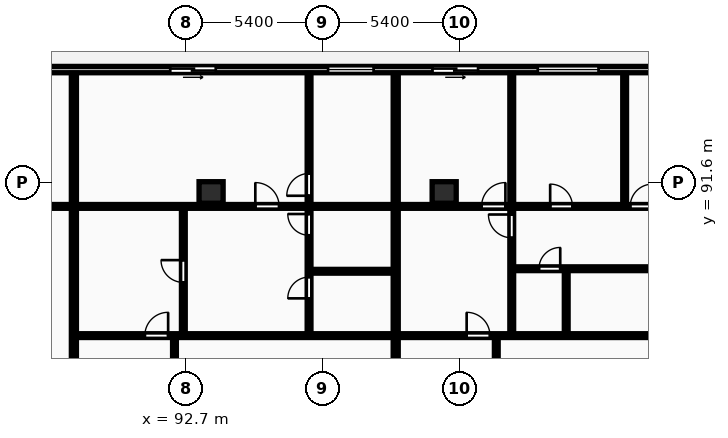
"""IFC4 building model, lengths in metres.
Left out: names, types, materials, properties, quantities, classifications, styles, units other than length and angle.
Written with IfcOpenShell. Run it as: python <this file> out.ifc"""

import sys

from ifc_helpers import new_model, si_unit, direction, frame, frame_2d, origin, origin_2d, place, context, subcontext, project, spatial, rectangle, extrude, element, fill, save


model = new_model("IFC4")
c1 = context("Model", 3, precision=1e-05, world=origin(), true_north=direction((0.0, 1.0)))
c2 = subcontext(c1, "Body", "Model", "MODEL_VIEW")
j1 = project(units=[si_unit("LENGTHUNIT", "METRE"), si_unit("PLANEANGLEUNIT", "RADIAN")], contexts=[c1])
p1 = place(None, origin())
s1 = spatial("IfcSite", under=j1, at=p1, CompositionType="ELEMENT")
p2 = place(p1, origin())
s2 = spatial("IfcBuilding", under=s1, at=p2, CompositionType="ELEMENT")
p3 = place(p2, frame((0.0, 0.0, 80.8)))
s3 = spatial("IfcBuildingStorey", under=s2, at=p3, CompositionType="ELEMENT", Elevation=80.8)
for number, where, z_axis, x_axis in (
    (1, (93.7, 91.2, 0.0), (0.0, 0.0, 1.0), (1.0, 0.0, 0.0)),
    (2, (102.9, 91.2, 0.0), (0.0, 0.0, 1.0), (1.0, 0.0, 0.0)),
):
    element("IfcColumn", number, at=place(p3, frame(where, z_axis=z_axis, x_axis=x_axis)), inside=s3, PredefinedType="COLUMN", context=c2, shape_type="SweptSolid", body=[
        extrude(rectangle(XDim=0.95, YDim=0.85, at=origin_2d()), origin(), (0.0, 0.0, 1.0), 3.25),
    ])
p4 = place(p3, frame((130.6, 96.05, 0.0), z_axis=(0.0, 0.0, 1.0), x_axis=(-1.0, 0.0, 0.0)))
e3 = element("IfcWall", 3, at=p4, inside=s3, PredefinedType="STANDARD", context=c2, shape_type="SweptSolid", body=[
    extrude(rectangle(XDim=73.0, YDim=0.25, at=frame_2d((36.5, 0.0))), origin(), (0.0, 0.0, 1.0), 2.97),
])
p5 = place(p4, frame((67.867, 0.0, 0.0)))
e4 = element("IfcOpeningElement", 4, at=p5, cuts=e3, PredefinedType="OPENING", context=c2, shape_type="SweptSolid", body=[
    extrude(rectangle(XDim=1.8, YDim=2.2, at=frame_2d((0.9, 1.1))), frame((0.0, 0.135, 0.0), z_axis=(0.0, -1.0, 0.0), x_axis=(1.0, 0.0, 0.0)), (0.0, 0.0, 1.0), 0.27),
])
p6 = place(p4, frame((62.103, 0.0, 0.85)))
e5 = element("IfcOpeningElement", 5, at=p6, cuts=e3, PredefinedType="OPENING", context=c2, shape_type="SweptSolid", body=[
    extrude(rectangle(XDim=1.8, YDim=1.8, at=frame_2d((0.9, 0.9))), frame((0.0, 0.135, 0.0), z_axis=(0.0, -1.0, 0.0), x_axis=(1.0, 0.0, 0.0)), (0.0, 0.0, 1.0), 0.27),
])
p7 = place(p4, frame((56.196, 0.0, 0.0)))
e6 = element("IfcOpeningElement", 6, at=p7, cuts=e3, PredefinedType="OPENING", context=c2, shape_type="SweptSolid", body=[
    extrude(rectangle(XDim=1.8, YDim=2.2, at=frame_2d((0.9, 1.1))), frame((0.0, 0.135, 0.0), z_axis=(0.0, -1.0, 0.0), x_axis=(1.0, 0.0, 0.0)), (0.0, 0.0, 1.0), 0.27),
])
p8 = place(p4, frame((46.557, 0.0, 0.85)))
e7 = element("IfcOpeningElement", 7, at=p8, cuts=e3, PredefinedType="OPENING", context=c2, shape_type="SweptSolid", body=[
    extrude(rectangle(XDim=2.4, YDim=1.9, at=frame_2d((1.2, 0.95))), frame((0.0, 0.135, 0.0), z_axis=(0.0, -1.0, 0.0), x_axis=(1.0, 0.0, 0.0)), (0.0, 0.0, 1.0), 0.27),
])
p9 = place(p4, frame((36.714, 0.0, 0.0)))
e8 = element("IfcOpeningElement", 8, at=p9, cuts=e3, PredefinedType="OPENING", context=c2, shape_type="SweptSolid", body=[
    extrude(rectangle(XDim=1.8, YDim=2.2, at=frame_2d((0.9, 1.1))), frame((0.0, 0.135, 0.0), z_axis=(0.0, -1.0, 0.0), x_axis=(1.0, 0.0, 0.0)), (0.0, 0.0, 1.0), 0.27),
])
p10 = place(p4, frame((30.483, 0.0, 0.85)))
e9 = element("IfcOpeningElement", 9, at=p10, cuts=e3, PredefinedType="OPENING", context=c2, shape_type="SweptSolid", body=[
    extrude(rectangle(XDim=1.8, YDim=1.8, at=frame_2d((0.9, 0.9))), frame((0.0, 0.135, 0.0), z_axis=(0.0, -1.0, 0.0), x_axis=(1.0, 0.0, 0.0)), (0.0, 0.0, 1.0), 0.27),
])
p11 = place(p4, frame((21.604, 0.0, 0.85)))
e10 = element("IfcOpeningElement", 10, at=p11, cuts=e3, PredefinedType="OPENING", context=c2, shape_type="SweptSolid", body=[
    extrude(rectangle(XDim=2.4, YDim=1.9, at=frame_2d((1.2, 0.95))), frame((0.0, 0.135, 0.0), z_axis=(0.0, -1.0, 0.0), x_axis=(1.0, 0.0, 0.0)), (0.0, 0.0, 1.0), 0.27),
])
p12 = place(p4, frame((17.698, 0.0, 0.85)))
e11 = element("IfcOpeningElement", 11, at=p12, cuts=e3, PredefinedType="OPENING", context=c2, shape_type="SweptSolid", body=[
    extrude(rectangle(XDim=1.8, YDim=1.8, at=frame_2d((0.9, 0.9))), frame((0.0, 0.135, 0.0), z_axis=(0.0, -1.0, 0.0), x_axis=(1.0, 0.0, 0.0)), (0.0, 0.0, 1.0), 0.27),
])
p13 = place(p4, frame((26.363, 0.0, 0.0)))
e12 = element("IfcOpeningElement", 12, at=p13, cuts=e3, PredefinedType="OPENING", context=c2, shape_type="SweptSolid", body=[
    extrude(rectangle(XDim=1.8, YDim=2.2, at=frame_2d((0.9, 1.1))), frame((0.0, 0.135, 0.0), z_axis=(0.0, -1.0, 0.0), x_axis=(1.0, 0.0, 0.0)), (0.0, 0.0, 1.0), 0.27),
])
p14 = place(p4, frame((13.753, 0.0, 0.85)))
e13 = element("IfcOpeningElement", 13, at=p14, cuts=e3, PredefinedType="OPENING", context=c2, shape_type="SweptSolid", body=[
    extrude(rectangle(XDim=1.8, YDim=1.8, at=frame_2d((0.9, 0.9))), frame((0.0, 0.135, 0.0), z_axis=(0.0, -1.0, 0.0), x_axis=(1.0, 0.0, 0.0)), (0.0, 0.0, 1.0), 0.27),
])
p15 = place(p4, frame((7.363, 0.0, 0.0)))
e14 = element("IfcOpeningElement", 14, at=p15, cuts=e3, PredefinedType="OPENING", context=c2, shape_type="SweptSolid", body=[
    extrude(rectangle(XDim=1.8, YDim=2.2, at=frame_2d((0.9, 1.1))), frame((0.0, 0.135, 0.0), z_axis=(0.0, -1.0, 0.0), x_axis=(1.0, 0.0, 0.0)), (0.0, 0.0, 1.0), 0.27),
])
p16 = place(p4, frame((0.9, 0.0, 0.85)))
e15 = element("IfcOpeningElement", 15, at=p16, cuts=e3, PredefinedType="OPENING", context=c2, shape_type="SweptSolid", body=[
    extrude(rectangle(XDim=2.4, YDim=1.9, at=frame_2d((1.2, 0.95))), frame((0.0, 0.135, 0.0), z_axis=(0.0, -1.0, 0.0), x_axis=(1.0, 0.0, 0.0)), (0.0, 0.0, 1.0), 0.27),
])
p17 = place(p3, frame((88.285, 69.43, 0.0), z_axis=(0.0, 0.0, 1.0), x_axis=(0.0, 1.0, 0.0)))
e16 = element("IfcWall", 16, at=p17, inside=s3, PredefinedType="PARTITIONING", context=c2, shape_type="SweptSolid", body=[
    extrude(rectangle(XDim=26.47, YDim=0.2, at=frame_2d((13.235, 0.0))), origin(), (0.0, 0.0, 1.0), 2.97),
])
p18 = place(p3, frame((69.447, 90.65, 0.0), z_axis=(0.0, 0.0, 1.0), x_axis=(1.0, 0.0, 0.0)))
e17 = element("IfcWall", 17, at=p18, inside=s3, PredefinedType="PARTITIONING", context=c2, shape_type="SweptSolid", body=[
    extrude(rectangle(XDim=18.758, YDim=0.15, at=frame_2d((9.379, 0.0))), origin(), (0.0, 0.0, 1.0), 2.97),
])
p19 = place(p18, frame((3.965, 0.0, 0.0)))
e18 = element("IfcOpeningElement", 18, at=p19, cuts=e17, PredefinedType="OPENING", context=c2, shape_type="SweptSolid", body=[
    extrude(rectangle(XDim=0.94, YDim=2.1, at=frame_2d((0.47, 1.05))), frame((0.0, 0.085, 0.0), z_axis=(0.0, -1.0, 0.0), x_axis=(1.0, 0.0, 0.0)), (0.0, 0.0, 1.0), 0.17),
])
p20 = place(p18, frame((8.909, 0.0, 0.0)))
e19 = element("IfcOpeningElement", 19, at=p20, cuts=e17, PredefinedType="OPENING", context=c2, shape_type="SweptSolid", body=[
    extrude(rectangle(XDim=0.94, YDim=2.1, at=frame_2d((0.47, 1.05))), frame((0.0, 0.085, 0.0), z_axis=(0.0, -1.0, 0.0), x_axis=(1.0, 0.0, 0.0)), (0.0, 0.0, 1.0), 0.17),
])
p21 = place(p3, frame((100.987, 69.43, 0.0), z_axis=(0.0, 0.0, 1.0), x_axis=(0.0, 1.0, 0.0)))
e20 = element("IfcWall", 20, at=p21, inside=s3, PredefinedType="PARTITIONING", context=c2, shape_type="SweptSolid", body=[
    extrude(rectangle(XDim=26.47, YDim=0.2, at=frame_2d((13.235, 0.0))), origin(), (0.0, 0.0, 1.0), 2.97),
])
p22 = place(p3, frame((92.255, 69.41, 0.0), z_axis=(0.0, 0.0, 1.0), x_axis=(0.0, 1.0, 0.0)))
e21 = element("IfcWall", 21, at=p22, inside=s3, PredefinedType="PARTITIONING", context=c2, shape_type="SweptSolid", body=[
    extrude(rectangle(XDim=16.1, YDim=0.15, at=frame_2d((8.05, 0.0))), origin(), (0.0, 0.0, 1.0), 2.97),
])
p23 = place(p22, frame((6.74, 0.0, 0.0)))
e22 = element("IfcOpeningElement", 22, at=p23, cuts=e21, PredefinedType="OPENING", context=c2, shape_type="SweptSolid", body=[
    extrude(rectangle(XDim=0.88, YDim=2.06, at=frame_2d((0.44, 1.03))), frame((0.0, 0.085, 0.0), z_axis=(0.0, -1.0, 0.0), x_axis=(1.0, 0.0, 0.0)), (0.0, 0.0, 1.0), 0.17),
])
p24 = place(p3, frame((92.604, 85.59, 0.0), z_axis=(0.0, 0.0, 1.0), x_axis=(0.0, 1.0, 0.0)))
e23 = element("IfcWall", 23, at=p24, inside=s3, PredefinedType="PARTITIONING", context=c2, shape_type="SweptSolid", body=[
    extrude(rectangle(XDim=5.0, YDim=0.15, at=frame_2d((2.5, 0.0))), origin(), (0.0, 0.0, 1.0), 2.97),
])
p25 = place(p24, frame((2.06, 0.0, 0.0)))
e24 = element("IfcOpeningElement", 24, at=p25, cuts=e23, PredefinedType="OPENING", context=c2, shape_type="SweptSolid", body=[
    extrude(rectangle(XDim=0.88, YDim=2.06, at=frame_2d((0.44, 1.03))), frame((0.0, 0.085, 0.0), z_axis=(0.0, -1.0, 0.0), x_axis=(1.0, 0.0, 0.0)), (0.0, 0.0, 1.0), 0.17),
])
p26 = place(p3, frame((97.627, 88.09, 0.0), z_axis=(0.0, 0.0, 1.0), x_axis=(1.0, 0.0, 0.0)))
e25 = element("IfcWall", 25, at=p26, inside=s3, PredefinedType="PARTITIONING", context=c2, shape_type="SweptSolid", body=[
    extrude(rectangle(XDim=3.28, YDim=0.15, at=frame_2d((1.64, 0.0))), origin(), (0.0, 0.0, 1.0), 2.97),
])
p27 = place(p3, frame((97.567, 85.59, 0.0), z_axis=(0.0, 0.0, 1.0), x_axis=(0.0, 1.0, 0.0)))
e26 = element("IfcWall", 26, at=p27, inside=s3, PredefinedType="PARTITIONING", context=c2, shape_type="SweptSolid", body=[
    extrude(rectangle(XDim=10.31, YDim=0.15, at=frame_2d((5.155, 0.0))), origin(), (0.0, 0.0, 1.0), 2.97),
])
p28 = place(p27, frame((1.43, 0.0, 0.0)))
e27 = element("IfcOpeningElement", 27, at=p28, cuts=e26, PredefinedType="OPENING", context=c2, shape_type="SweptSolid", body=[
    extrude(rectangle(XDim=0.84, YDim=2.04, at=frame_2d((0.42, 1.02))), frame((0.0, 0.085, 0.0), z_axis=(0.0, -1.0, 0.0), x_axis=(1.0, 0.0, 0.0)), (0.0, 0.0, 1.0), 0.17),
])
p29 = place(p27, frame((3.92, 0.0, 0.0)))
e28 = element("IfcOpeningElement", 28, at=p29, cuts=e26, PredefinedType="OPENING", context=c2, shape_type="SweptSolid", body=[
    extrude(rectangle(XDim=0.84, YDim=2.04, at=frame_2d((0.42, 1.02))), frame((0.0, 0.085, 0.0), z_axis=(0.0, -1.0, 0.0), x_axis=(1.0, 0.0, 0.0)), (0.0, 0.0, 1.0), 0.17),
])
p30 = place(p27, frame((5.48, 0.0, 0.0)))
e29 = element("IfcOpeningElement", 29, at=p30, cuts=e26, PredefinedType="OPENING", context=c2, shape_type="SweptSolid", body=[
    extrude(rectangle(XDim=0.88, YDim=2.06, at=frame_2d((0.44, 1.03))), frame((0.0, 0.085, 0.0), z_axis=(0.0, -1.0, 0.0), x_axis=(1.0, 0.0, 0.0)), (0.0, 0.0, 1.0), 0.17),
])
p31 = place(p3, frame((88.365, 85.55, 0.0), z_axis=(0.0, 0.0, 1.0), x_axis=(1.0, 0.0, 0.0)))
e30 = element("IfcWall", 30, at=p31, inside=s3, PredefinedType="PARTITIONING", context=c2, shape_type="SweptSolid", body=[
    extrude(rectangle(XDim=12.543, YDim=0.15, at=frame_2d((6.271, 0.0))), origin(), (0.0, 0.0, 1.0), 2.97),
])
p32 = place(p31, frame((2.72, 0.0, 0.0)))
e31 = element("IfcOpeningElement", 31, at=p32, cuts=e30, PredefinedType="OPENING", context=c2, shape_type="SweptSolid", body=[
    extrude(rectangle(XDim=0.92, YDim=2.08, at=frame_2d((0.46, 1.04))), frame((0.0, 0.085, 0.0), z_axis=(0.0, -1.0, 0.0), x_axis=(1.0, 0.0, 0.0)), (0.0, 0.0, 1.0), 0.17),
])
p33 = place(p3, frame((88.365, 90.65, 0.0), z_axis=(0.0, 0.0, 1.0), x_axis=(1.0, 0.0, 0.0)))
e32 = element("IfcWall", 32, at=p33, inside=s3, PredefinedType="PARTITIONING", context=c2, shape_type="SweptSolid", body=[
    extrude(rectangle(XDim=12.543, YDim=0.15, at=frame_2d((6.271, 0.0))), origin(), (0.0, 0.0, 1.0), 2.97),
])
p34 = place(p33, frame((7.081, 0.0, 0.0)))
e33 = element("IfcOpeningElement", 33, at=p34, cuts=e32, PredefinedType="OPENING", context=c2, shape_type="SweptSolid", body=[
    extrude(rectangle(XDim=0.94, YDim=2.1, at=frame_2d((0.47, 1.05))), frame((0.0, 0.085, 0.0), z_axis=(0.0, -1.0, 0.0), x_axis=(1.0, 0.0, 0.0)), (0.0, 0.0, 1.0), 0.17),
])
p35 = place(p3, frame((104.957, 69.41, 0.0), z_axis=(0.0, 0.0, 1.0), x_axis=(0.0, 1.0, 0.0)))
e34 = element("IfcWall", 34, at=p35, inside=s3, PredefinedType="PARTITIONING", context=c2, shape_type="SweptSolid", body=[
    extrude(rectangle(XDim=16.1, YDim=0.15, at=frame_2d((8.05, 0.0))), origin(), (0.0, 0.0, 1.0), 2.97),
])
p36 = place(p35, frame((6.92, 0.0, 0.0)))
e35 = element("IfcOpeningElement", 35, at=p36, cuts=e34, PredefinedType="OPENING", context=c2, shape_type="SweptSolid", body=[
    extrude(rectangle(XDim=0.88, YDim=2.06, at=frame_2d((0.44, 1.03))), frame((0.0, 0.085, 0.0), z_axis=(0.0, -1.0, 0.0), x_axis=(1.0, 0.0, 0.0)), (0.0, 0.0, 1.0), 0.17),
])
p37 = place(p3, frame((107.717, 85.59, 0.0), z_axis=(0.0, 0.0, 1.0), x_axis=(0.0, 1.0, 0.0)))
e36 = element("IfcWall", 36, at=p37, inside=s3, PredefinedType="PARTITIONING", context=c2, shape_type="SweptSolid", body=[
    extrude(rectangle(XDim=2.58, YDim=0.15, at=frame_2d((1.29, 0.0))), origin(), (0.0, 0.0, 1.0), 2.97),
])
p38 = place(p3, frame((110.024, 90.73, 0.0), z_axis=(0.0, 0.0, 1.0), x_axis=(0.0, 1.0, 0.0)))
e37 = element("IfcWall", 37, at=p38, inside=s3, PredefinedType="PARTITIONING", context=c2, shape_type="SweptSolid", body=[
    extrude(rectangle(XDim=5.17, YDim=0.15, at=frame_2d((2.585, 0.0))), origin(), (0.0, 0.0, 1.0), 2.97),
])
p39 = place(p3, frame((105.567, 85.59, 0.0), z_axis=(0.0, 0.0, 1.0), x_axis=(0.0, 1.0, 0.0)))
e38 = element("IfcWall", 38, at=p39, inside=s3, PredefinedType="PARTITIONING", context=c2, shape_type="SweptSolid", body=[
    extrude(rectangle(XDim=10.31, YDim=0.15, at=frame_2d((5.155, 0.0))), origin(), (0.0, 0.0, 1.0), 2.97),
])
p40 = place(p39, frame((3.82, 0.0, 0.0)))
e39 = element("IfcOpeningElement", 39, at=p40, cuts=e38, PredefinedType="OPENING", context=c2, shape_type="SweptSolid", body=[
    extrude(rectangle(XDim=0.92, YDim=2.08, at=frame_2d((0.46, 1.04))), frame((0.0, 0.085, 0.0), z_axis=(0.0, -1.0, 0.0), x_axis=(1.0, 0.0, 0.0)), (0.0, 0.0, 1.0), 0.17),
])
p41 = place(p3, frame((105.607, 88.19, 0.0), z_axis=(0.0, 0.0, 1.0), x_axis=(1.0, 0.0, 0.0)))
e40 = element("IfcWall", 40, at=p41, inside=s3, PredefinedType="PARTITIONING", context=c2, shape_type="SweptSolid", body=[
    extrude(rectangle(XDim=12.346, YDim=0.15, at=frame_2d((6.173, 0.0))), origin(), (0.0, 0.0, 1.0), 2.97),
])
p42 = place(p41, frame((1.034, 0.0, 0.0)))
e41 = element("IfcOpeningElement", 41, at=p42, cuts=e40, PredefinedType="OPENING", context=c2, shape_type="SweptSolid", body=[
    extrude(rectangle(XDim=0.84, YDim=2.04, at=frame_2d((0.42, 1.02))), frame((0.0, 0.085, 0.0), z_axis=(0.0, -1.0, 0.0), x_axis=(1.0, 0.0, 0.0)), (0.0, 0.0, 1.0), 0.17),
])
p43 = place(p41, frame((5.753, 0.0, 0.0)))
e42 = element("IfcOpeningElement", 42, at=p43, cuts=e40, PredefinedType="OPENING", context=c2, shape_type="SweptSolid", body=[
    extrude(rectangle(XDim=0.84, YDim=2.04, at=frame_2d((0.42, 1.02))), frame((0.0, 0.085, 0.0), z_axis=(0.0, -1.0, 0.0), x_axis=(1.0, 0.0, 0.0)), (0.0, 0.0, 1.0), 0.17),
])
p44 = place(p41, frame((8.623, 0.0, 0.0)))
e43 = element("IfcOpeningElement", 43, at=p44, cuts=e40, PredefinedType="OPENING", context=c2, shape_type="SweptSolid", body=[
    extrude(rectangle(XDim=0.84, YDim=2.04, at=frame_2d((0.42, 1.02))), frame((0.0, 0.085, 0.0), z_axis=(0.0, -1.0, 0.0), x_axis=(1.0, 0.0, 0.0)), (0.0, 0.0, 1.0), 0.17),
])
p45 = place(p3, frame((101.067, 85.55, 0.0), z_axis=(0.0, 0.0, 1.0), x_axis=(1.0, 0.0, 0.0)))
e44 = element("IfcWall", 44, at=p45, inside=s3, PredefinedType="PARTITIONING", context=c2, shape_type="SweptSolid", body=[
    extrude(rectangle(XDim=16.886, YDim=0.15, at=frame_2d((8.443, 0.0))), origin(), (0.0, 0.0, 1.0), 2.97),
])
p46 = place(p45, frame((2.72, 0.0, 0.0)))
e45 = element("IfcOpeningElement", 45, at=p46, cuts=e44, PredefinedType="OPENING", context=c2, shape_type="SweptSolid", body=[
    extrude(rectangle(XDim=0.92, YDim=2.08, at=frame_2d((0.46, 1.04))), frame((0.0, 0.085, 0.0), z_axis=(0.0, -1.0, 0.0), x_axis=(1.0, 0.0, 0.0)), (0.0, 0.0, 1.0), 0.17),
])
p47 = place(p3, frame((101.067, 90.65, 0.0), z_axis=(0.0, 0.0, 1.0), x_axis=(1.0, 0.0, 0.0)))
e46 = element("IfcWall", 46, at=p47, inside=s3, PredefinedType="PARTITIONING", context=c2, shape_type="SweptSolid", body=[
    extrude(rectangle(XDim=12.913, YDim=0.15, at=frame_2d((6.457, 0.0))), origin(), (0.0, 0.0, 1.0), 2.97),
])
p48 = place(p47, frame((3.31, 0.0, 0.0)))
e47 = element("IfcOpeningElement", 47, at=p48, cuts=e46, PredefinedType="OPENING", context=c2, shape_type="SweptSolid", body=[
    extrude(rectangle(XDim=0.94, YDim=2.1, at=frame_2d((0.47, 1.05))), frame((0.0, 0.085, 0.0), z_axis=(0.0, -1.0, 0.0), x_axis=(1.0, 0.0, 0.0)), (0.0, 0.0, 1.0), 0.17),
])
p49 = place(p47, frame((6.016, 0.0, 0.0)))
e48 = element("IfcOpeningElement", 48, at=p49, cuts=e46, PredefinedType="OPENING", context=c2, shape_type="SweptSolid", body=[
    extrude(rectangle(XDim=0.88, YDim=2.06, at=frame_2d((0.44, 1.03))), frame((0.0, 0.085, 0.0), z_axis=(0.0, -1.0, 0.0), x_axis=(1.0, 0.0, 0.0)), (0.0, 0.0, 1.0), 0.17),
])
p50 = place(p47, frame((9.177, 0.0, 0.0)))
e49 = element("IfcOpeningElement", 49, at=p50, cuts=e46, PredefinedType="OPENING", context=c2, shape_type="SweptSolid", body=[
    extrude(rectangle(XDim=0.88, YDim=2.06, at=frame_2d((0.44, 1.03))), frame((0.0, 0.085, 0.0), z_axis=(0.0, -1.0, 0.0), x_axis=(1.0, 0.0, 0.0)), (0.0, 0.0, 1.0), 0.17),
])
p51 = place(p9, origin())
e50 = element("IfcDoor", 50, at=p51, inside=s3, OperationType="SLIDING_TO_LEFT", PredefinedType="DOOR", context=c2, shape_type="SweptSolid", body=[
    extrude(rectangle(XDim=1.8, YDim=2.2, at=frame_2d((0.9, 1.1))), frame((0.0, 0.025, 0.0), z_axis=(0.0, -1.0, 0.0), x_axis=(1.0, 0.0, 0.0)), (0.0, 0.0, 1.0), 0.05),
])
fill(e8, e50)
p52 = place(p10, origin())
e51 = element("IfcWindow", 51, at=p52, inside=s3, PartitioningType="SINGLE_PANEL", PredefinedType="WINDOW", context=c2, shape_type="SweptSolid", body=[
    extrude(rectangle(XDim=1.8, YDim=1.8, at=frame_2d((0.9, 0.9))), frame((0.0, 0.03, 0.0), z_axis=(0.0, -1.0, 0.0), x_axis=(1.0, 0.0, 0.0)), (0.0, 0.0, 1.0), 0.06),
])
fill(e9, e51)
p53 = place(p11, origin())
e52 = element("IfcWindow", 52, at=p53, inside=s3, PartitioningType="DOUBLE_PANEL_VERTICAL", PredefinedType="WINDOW", context=c2, shape_type="SweptSolid", body=[
    extrude(rectangle(XDim=2.4, YDim=1.9, at=frame_2d((1.2, 0.95))), frame((0.0, 0.03, 0.0), z_axis=(0.0, -1.0, 0.0), x_axis=(1.0, 0.0, 0.0)), (0.0, 0.0, 1.0), 0.06),
])
fill(e10, e52)
p54 = place(p13, origin())
e53 = element("IfcDoor", 53, at=p54, inside=s3, OperationType="SLIDING_TO_LEFT", PredefinedType="DOOR", context=c2, shape_type="SweptSolid", body=[
    extrude(rectangle(XDim=1.8, YDim=2.2, at=frame_2d((0.9, 1.1))), frame((0.0, 0.025, 0.0), z_axis=(0.0, -1.0, 0.0), x_axis=(1.0, 0.0, 0.0)), (0.0, 0.0, 1.0), 0.05),
])
fill(e12, e53)
p55 = place(p25, origin())
e54 = element("IfcDoor", 54, at=p55, inside=s3, OperationType="SINGLE_SWING_RIGHT", PredefinedType="DOOR", context=c2, shape_type="SweptSolid", body=[
    extrude(rectangle(XDim=0.88, YDim=2.06, at=frame_2d((0.44, 1.03))), frame((0.0, 0.025, 0.0), z_axis=(0.0, -1.0, 0.0), x_axis=(1.0, 0.0, 0.0)), (0.0, 0.0, 1.0), 0.05),
])
fill(e24, e54)
p56 = place(p28, origin())
e55 = element("IfcDoor", 55, at=p56, inside=s3, OperationType="SINGLE_SWING_LEFT", PredefinedType="DOOR", context=c2, shape_type="SweptSolid", body=[
    extrude(rectangle(XDim=0.84, YDim=2.04, at=frame_2d((0.42, 1.02))), frame((0.0, 0.025, 0.0), z_axis=(0.0, -1.0, 0.0), x_axis=(1.0, 0.0, 0.0)), (0.0, 0.0, 1.0), 0.05),
])
fill(e27, e55)
p57 = place(p29, origin())
e56 = element("IfcDoor", 56, at=p57, inside=s3, OperationType="SINGLE_SWING_RIGHT", PredefinedType="DOOR", context=c2, shape_type="SweptSolid", body=[
    extrude(rectangle(XDim=0.84, YDim=2.04, at=frame_2d((0.42, 1.02))), frame((0.0, 0.025, 0.0), z_axis=(0.0, -1.0, 0.0), x_axis=(1.0, 0.0, 0.0)), (0.0, 0.0, 1.0), 0.05),
])
fill(e28, e56)
p58 = place(p30, origin())
e57 = element("IfcDoor", 57, at=p58, inside=s3, OperationType="SINGLE_SWING_LEFT", PredefinedType="DOOR", context=c2, shape_type="SweptSolid", body=[
    extrude(rectangle(XDim=0.88, YDim=2.06, at=frame_2d((0.44, 1.03))), frame((0.0, 0.025, 0.0), z_axis=(0.0, -1.0, 0.0), x_axis=(1.0, 0.0, 0.0)), (0.0, 0.0, 1.0), 0.05),
])
fill(e29, e57)
p59 = place(p32, origin())
e58 = element("IfcDoor", 58, at=p59, inside=s3, OperationType="SINGLE_SWING_RIGHT", PredefinedType="DOOR", context=c2, shape_type="SweptSolid", body=[
    extrude(rectangle(XDim=0.92, YDim=2.08, at=frame_2d((0.46, 1.04))), frame((0.0, 0.025, 0.0), z_axis=(0.0, -1.0, 0.0), x_axis=(1.0, 0.0, 0.0)), (0.0, 0.0, 1.0), 0.05),
])
fill(e31, e58)
p60 = place(p34, origin())
e59 = element("IfcDoor", 59, at=p60, inside=s3, OperationType="SINGLE_SWING_LEFT", PredefinedType="DOOR", context=c2, shape_type="SweptSolid", body=[
    extrude(rectangle(XDim=0.94, YDim=2.1, at=frame_2d((0.47, 1.05))), frame((0.0, 0.025, 0.0), z_axis=(0.0, -1.0, 0.0), x_axis=(1.0, 0.0, 0.0)), (0.0, 0.0, 1.0), 0.05),
])
fill(e33, e59)
p61 = place(p40, origin())
e60 = element("IfcDoor", 60, at=p61, inside=s3, OperationType="SINGLE_SWING_RIGHT", PredefinedType="DOOR", context=c2, shape_type="SweptSolid", body=[
    extrude(rectangle(XDim=0.92, YDim=2.08, at=frame_2d((0.46, 1.04))), frame((0.0, 0.025, 0.0), z_axis=(0.0, -1.0, 0.0), x_axis=(1.0, 0.0, 0.0)), (0.0, 0.0, 1.0), 0.05),
])
fill(e39, e60)
p62 = place(p42, origin())
e61 = element("IfcDoor", 61, at=p62, inside=s3, OperationType="SINGLE_SWING_RIGHT", PredefinedType="DOOR", context=c2, shape_type="SweptSolid", body=[
    extrude(rectangle(XDim=0.84, YDim=2.04, at=frame_2d((0.42, 1.02))), frame((0.0, 0.025, 0.0), z_axis=(0.0, -1.0, 0.0), x_axis=(1.0, 0.0, 0.0)), (0.0, 0.0, 1.0), 0.05),
])
fill(e41, e61)
p63 = place(p46, origin())
e62 = element("IfcDoor", 62, at=p63, inside=s3, OperationType="SINGLE_SWING_LEFT", PredefinedType="DOOR", context=c2, shape_type="SweptSolid", body=[
    extrude(rectangle(XDim=0.92, YDim=2.08, at=frame_2d((0.46, 1.04))), frame((0.0, 0.025, 0.0), z_axis=(0.0, -1.0, 0.0), x_axis=(1.0, 0.0, 0.0)), (0.0, 0.0, 1.0), 0.05),
])
fill(e45, e62)
p64 = place(p48, origin())
e63 = element("IfcDoor", 63, at=p64, inside=s3, OperationType="SINGLE_SWING_RIGHT", PredefinedType="DOOR", context=c2, shape_type="SweptSolid", body=[
    extrude(rectangle(XDim=0.94, YDim=2.1, at=frame_2d((0.47, 1.05))), frame((0.0, 0.025, 0.0), z_axis=(0.0, -1.0, 0.0), x_axis=(1.0, 0.0, 0.0)), (0.0, 0.0, 1.0), 0.05),
])
fill(e47, e63)
p65 = place(p49, origin())
e64 = element("IfcDoor", 64, at=p65, inside=s3, OperationType="SINGLE_SWING_LEFT", PredefinedType="DOOR", context=c2, shape_type="SweptSolid", body=[
    extrude(rectangle(XDim=0.88, YDim=2.06, at=frame_2d((0.44, 1.03))), frame((0.0, 0.025, 0.0), z_axis=(0.0, -1.0, 0.0), x_axis=(1.0, 0.0, 0.0)), (0.0, 0.0, 1.0), 0.05),
])
fill(e48, e64)
p66 = place(p50, origin())
e65 = element("IfcDoor", 65, at=p66, inside=s3, OperationType="SINGLE_SWING_RIGHT", PredefinedType="DOOR", context=c2, shape_type="SweptSolid", body=[
    extrude(rectangle(XDim=0.88, YDim=2.06, at=frame_2d((0.44, 1.03))), frame((0.0, 0.025, 0.0), z_axis=(0.0, -1.0, 0.0), x_axis=(1.0, 0.0, 0.0)), (0.0, 0.0, 1.0), 0.05),
])
fill(e49, e65)
save(model, sys.argv[1])
